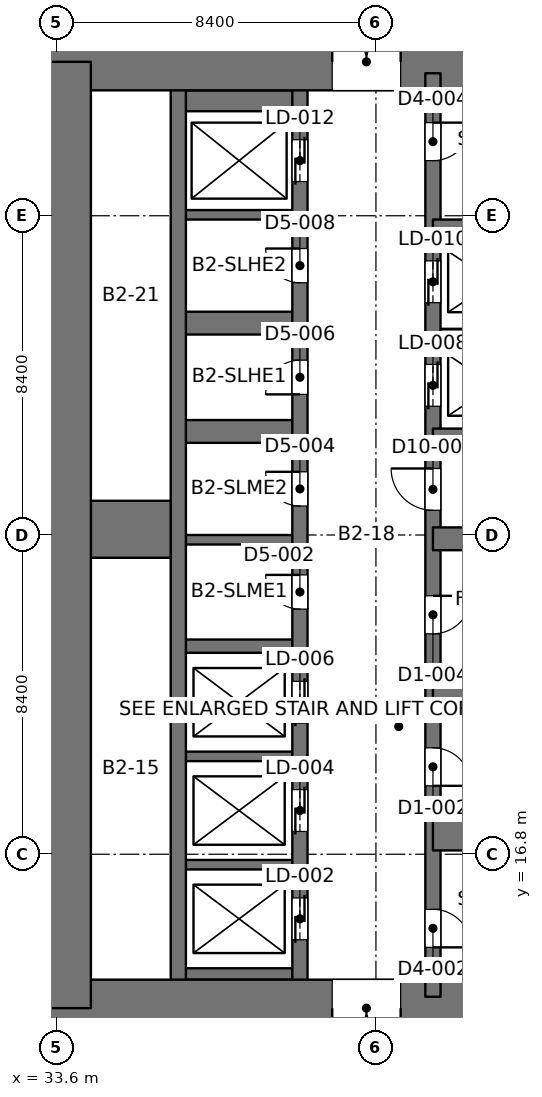
"""IFC4 building model, lengths in metres.
Left out: names, types, materials, properties, quantities, classifications, styles, units other than length and angle.
Written with IfcOpenShell. Run it as: python <this file> out.ifc"""

import sys

from ifc_helpers import new_model, si_unit, direction, frame, frame_2d, origin, place, context, subcontext, project, spatial, rectangle, extrude, element, fill, save


model = new_model("IFC4")
c1 = context("Model", 3, precision=1e-05, world=origin(), true_north=direction((0.0, 1.0)))
c2 = subcontext(c1, "Body", "Model", "MODEL_VIEW")
j1 = project(units=[si_unit("LENGTHUNIT", "METRE"), si_unit("PLANEANGLEUNIT", "RADIAN")], contexts=[c1])
p1 = place(None, origin())
s1 = spatial("IfcSite", under=j1, at=p1, CompositionType="ELEMENT")
p2 = place(p1, origin())
s2 = spatial("IfcBuilding", under=s1, at=p2, CompositionType="ELEMENT")
p3 = place(p2, frame((0.0, 0.0, -8.4)))
s3 = spatial("IfcBuildingStorey", under=s2, at=p3, CompositionType="ELEMENT", Elevation=-8.4)
p4 = place(p3, frame((33.0, 12.75, 0.0), z_axis=(0.0, 0.0, 1.0), x_axis=(1.0, 0.0, 0.0)))
e1 = element("IfcWall", 1, at=p4, inside=s3, PredefinedType="SHEAR", context=c2, shape_type="SweptSolid", body=[
    extrude(rectangle(XDim=19.2, YDim=1.5, at=frame_2d((9.6, 0.0))), origin(), (0.0, 0.0, 1.0), 4.2),
])
p5 = place(p4, frame((7.85, 0.0, 0.0)))
e2 = element("IfcOpeningElement", 2, at=p5, cuts=e1, PredefinedType="OPENING", context=c2, shape_type="SweptSolid", body=[
    extrude(rectangle(XDim=1.8, YDim=2.4, at=frame_2d((0.9, 1.2))), frame((0.0, 0.76, 0.0), z_axis=(0.0, -1.0, 0.0), x_axis=(1.0, 0.0, 0.0)), (0.0, 0.0, 1.0), 1.52),
])
p6 = place(p3, frame((33.0, 37.65, 0.0), z_axis=(0.0, 0.0, 1.0), x_axis=(1.0, 0.0, 0.0)))
e3 = element("IfcWall", 3, at=p6, inside=s3, PredefinedType="SHEAR", context=c2, shape_type="SweptSolid", body=[
    extrude(rectangle(XDim=19.2, YDim=1.5, at=frame_2d((9.6, 0.0))), origin(), (0.0, 0.0, 1.0), 4.2),
])
p7 = place(p6, frame((7.85, 0.0, 0.0)))
e4 = element("IfcOpeningElement", 4, at=p7, cuts=e3, PredefinedType="OPENING", context=c2, shape_type="SweptSolid", body=[
    extrude(rectangle(XDim=1.8, YDim=2.4, at=frame_2d((0.9, 1.2))), frame((0.0, 0.76, 0.0), z_axis=(0.0, -1.0, 0.0), x_axis=(1.0, 0.0, 0.0)), (0.0, 0.0, 1.0), 1.52),
])
p8 = place(p3, frame((33.75, 12.75, 0.0), z_axis=(0.0, 0.0, 1.0), x_axis=(0.0, 1.0, 0.0)))
e5 = element("IfcWall", 5, at=p8, inside=s3, PredefinedType="SHEAR", context=c2, shape_type="SweptSolid", body=[
    extrude(rectangle(XDim=24.9, YDim=1.5, at=frame_2d((12.45, 0.0))), origin(), (0.0, 0.0, 1.0), 4.2),
])
p9 = place(p3, frame((43.5, 13.05, 0.0), z_axis=(0.0, 0.0, 1.0), x_axis=(0.0, 1.0, 0.0)))
e6 = element("IfcWall", 6, at=p9, inside=s3, PredefinedType="SHEAR", context=c2, shape_type="SweptSolid", body=[
    extrude(rectangle(XDim=24.3, YDim=0.4, at=frame_2d((12.15, 0.0))), origin(), (0.0, 0.0, 1.0), 4.2),
])
p10 = place(p9, frame((1.3, 0.0, 0.0)))
e7 = element("IfcOpeningElement", 7, at=p10, cuts=e6, PredefinedType="OPENING", context=c2, shape_type="SweptSolid", body=[
    extrude(rectangle(XDim=1.0, YDim=2.2, at=frame_2d((0.5, 1.1))), frame((0.0, 0.21, 0.0), z_axis=(0.0, -1.0, 0.0), x_axis=(1.0, 0.0, 0.0)), (0.0, 0.0, 1.0), 0.42),
])
p11 = place(p9, frame((22.0, 0.0, 0.0)))
e8 = element("IfcOpeningElement", 8, at=p11, cuts=e6, PredefinedType="OPENING", context=c2, shape_type="SweptSolid", body=[
    extrude(rectangle(XDim=1.0, YDim=2.2, at=frame_2d((0.5, 1.1))), frame((0.0, 0.21, 0.0), z_axis=(0.0, -1.0, 0.0), x_axis=(1.0, 0.0, 0.0)), (0.0, 0.0, 1.0), 0.42),
])
p12 = place(p9, frame((5.55, 0.0, 0.0)))
e9 = element("IfcOpeningElement", 9, at=p12, cuts=e6, PredefinedType="OPENING", context=c2, shape_type="SweptSolid", body=[
    extrude(rectangle(XDim=1.0, YDim=2.2, at=frame_2d((0.5, 1.1))), frame((0.0, 0.21, 0.0), z_axis=(0.0, -1.0, 0.0), x_axis=(1.0, 0.0, 0.0)), (0.0, 0.0, 1.0), 0.42),
])
p13 = place(p9, frame((9.55, 0.0, 0.0)))
e10 = element("IfcOpeningElement", 10, at=p13, cuts=e6, PredefinedType="OPENING", context=c2, shape_type="SweptSolid", body=[
    extrude(rectangle(XDim=1.0, YDim=2.2, at=frame_2d((0.5, 1.1))), frame((0.0, 0.21, 0.0), z_axis=(0.0, -1.0, 0.0), x_axis=(1.0, 0.0, 0.0)), (0.0, 0.0, 1.0), 0.42),
])
p14 = place(p9, frame((12.8, 0.0, 0.0)))
e11 = element("IfcOpeningElement", 11, at=p14, cuts=e6, PredefinedType="OPENING", context=c2, shape_type="SweptSolid", body=[
    extrude(rectangle(XDim=1.1, YDim=2.2, at=frame_2d((0.55, 1.1))), frame((0.0, 0.21, 0.0), z_axis=(0.0, -1.0, 0.0), x_axis=(1.0, 0.0, 0.0)), (0.0, 0.0, 1.0), 0.42),
])
p15 = place(p9, frame((15.538, 0.0, 0.0)))
e12 = element("IfcOpeningElement", 12, at=p15, cuts=e6, PredefinedType="OPENING", context=c2, shape_type="SweptSolid", body=[
    extrude(rectangle(XDim=1.1, YDim=2.2, at=frame_2d((0.55, 1.1))), frame((0.0, 0.21, 0.0), z_axis=(0.0, -1.0, 0.0), x_axis=(1.0, 0.0, 0.0)), (0.0, 0.0, 1.0), 0.42),
])
p16 = place(p9, frame((18.262, 0.0, 0.0)))
e13 = element("IfcOpeningElement", 13, at=p16, cuts=e6, PredefinedType="OPENING", context=c2, shape_type="SweptSolid", body=[
    extrude(rectangle(XDim=1.1, YDim=2.2, at=frame_2d((0.55, 1.1))), frame((0.0, 0.21, 0.0), z_axis=(0.0, -1.0, 0.0), x_axis=(1.0, 0.0, 0.0)), (0.0, 0.0, 1.0), 0.42),
])
p17 = place(p3, frame((40.0, 13.05, 0.0), z_axis=(0.0, 0.0, 1.0), x_axis=(0.0, 1.0, 0.0)))
e14 = element("IfcWall", 14, at=p17, inside=s3, PredefinedType="SHEAR", context=c2, shape_type="SweptSolid", body=[
    extrude(rectangle(XDim=24.3, YDim=0.4, at=frame_2d((12.15, 0.0))), origin(), (0.0, 0.0, 1.0), 4.2),
])
p18 = place(p17, frame((1.5, 0.0, 0.0)))
e15 = element("IfcOpeningElement", 15, at=p18, cuts=e14, PredefinedType="OPENING", context=c2, shape_type="SweptSolid", body=[
    extrude(rectangle(XDim=1.1, YDim=2.2, at=frame_2d((0.55, 1.1))), frame((0.0, 0.21, 0.0), z_axis=(0.0, -1.0, 0.0), x_axis=(1.0, 0.0, 0.0)), (0.0, 0.0, 1.0), 0.42),
])
p19 = place(p17, frame((4.35, 0.0, 0.0)))
e16 = element("IfcOpeningElement", 16, at=p19, cuts=e14, PredefinedType="OPENING", context=c2, shape_type="SweptSolid", body=[
    extrude(rectangle(XDim=1.1, YDim=2.2, at=frame_2d((0.55, 1.1))), frame((0.0, 0.21, 0.0), z_axis=(0.0, -1.0, 0.0), x_axis=(1.0, 0.0, 0.0)), (0.0, 0.0, 1.0), 0.42),
])
p20 = place(p17, frame((7.2, 0.0, 0.0)))
e17 = element("IfcOpeningElement", 17, at=p20, cuts=e14, PredefinedType="OPENING", context=c2, shape_type="SweptSolid", body=[
    extrude(rectangle(XDim=1.1, YDim=2.2, at=frame_2d((0.55, 1.1))), frame((0.0, 0.21, 0.0), z_axis=(0.0, -1.0, 0.0), x_axis=(1.0, 0.0, 0.0)), (0.0, 0.0, 1.0), 0.42),
])
p21 = place(p17, frame((21.45, 0.0, 0.0)))
e18 = element("IfcOpeningElement", 18, at=p21, cuts=e14, PredefinedType="OPENING", context=c2, shape_type="SweptSolid", body=[
    extrude(rectangle(XDim=1.1, YDim=2.2, at=frame_2d((0.55, 1.1))), frame((0.0, 0.21, 0.0), z_axis=(0.0, -1.0, 0.0), x_axis=(1.0, 0.0, 0.0)), (0.0, 0.0, 1.0), 0.42),
])
p22 = place(p17, frame((10.2, 0.0, 0.0)))
e19 = element("IfcOpeningElement", 19, at=p22, cuts=e14, PredefinedType="OPENING", context=c2, shape_type="SweptSolid", body=[
    extrude(rectangle(XDim=0.9, YDim=2.2, at=frame_2d((0.45, 1.1))), frame((0.0, 0.21, 0.0), z_axis=(0.0, -1.0, 0.0), x_axis=(1.0, 0.0, 0.0)), (0.0, 0.0, 1.0), 0.42),
])
p23 = place(p17, frame((12.913, 0.0, 0.0)))
e20 = element("IfcOpeningElement", 20, at=p23, cuts=e14, PredefinedType="OPENING", context=c2, shape_type="SweptSolid", body=[
    extrude(rectangle(XDim=0.9, YDim=2.2, at=frame_2d((0.45, 1.1))), frame((0.0, 0.21, 0.0), z_axis=(0.0, -1.0, 0.0), x_axis=(1.0, 0.0, 0.0)), (0.0, 0.0, 1.0), 0.42),
])
p24 = place(p17, frame((15.85, 0.0, 0.0)))
e21 = element("IfcOpeningElement", 21, at=p24, cuts=e14, PredefinedType="OPENING", context=c2, shape_type="SweptSolid", body=[
    extrude(rectangle(XDim=0.9, YDim=2.2, at=frame_2d((0.45, 1.1))), frame((0.0, 0.21, 0.0), z_axis=(0.0, -1.0, 0.0), x_axis=(1.0, 0.0, 0.0)), (0.0, 0.0, 1.0), 0.42),
])
p25 = place(p17, frame((18.788, 0.0, 0.0)))
e22 = element("IfcOpeningElement", 22, at=p25, cuts=e14, PredefinedType="OPENING", context=c2, shape_type="SweptSolid", body=[
    extrude(rectangle(XDim=0.9, YDim=2.2, at=frame_2d((0.45, 1.1))), frame((0.0, 0.21, 0.0), z_axis=(0.0, -1.0, 0.0), x_axis=(1.0, 0.0, 0.0)), (0.0, 0.0, 1.0), 0.42),
])
p26 = place(p3, frame((36.8, 13.05, 0.0), z_axis=(0.0, 0.0, 1.0), x_axis=(0.0, 1.0, 0.0)))
e23 = element("IfcWall", 23, at=p26, inside=s3, PredefinedType="SHEAR", context=c2, shape_type="SweptSolid", body=[
    extrude(rectangle(XDim=24.3, YDim=0.4, at=frame_2d((12.15, 0.0))), origin(), (0.0, 0.0, 1.0), 4.2),
])
p27 = place(p3, frame((51.15, 17.35, 0.0), z_axis=(0.0, 0.0, 1.0), x_axis=(-1.0, 0.0, 0.0)))
e24 = element("IfcWall", 24, at=p27, inside=s3, PredefinedType="SHEAR", context=c2, shape_type="SweptSolid", body=[
    extrude(rectangle(XDim=7.65, YDim=0.9, at=frame_2d((3.825, 0.0))), origin(), (0.0, 0.0, 1.0), 4.2),
])
for number, where, z_axis, x_axis in (
    (25, (51.15, 21.1, 0.0), (0.0, 0.0, 1.0), (-1.0, 0.0, 0.0)),
    (26, (51.15, 25.1, 0.0), (0.0, 0.0, 1.0), (-1.0, 0.0, 0.0)),
    (27, (51.15, 27.7, 0.0), (0.0, 0.0, 1.0), (-1.0, 0.0, 0.0)),
):
    element("IfcWall", number, at=place(p3, frame(where, z_axis=z_axis, x_axis=x_axis)), inside=s3, PredefinedType="SHEAR", context=c2, shape_type="SweptSolid", body=[
        extrude(rectangle(XDim=7.65, YDim=0.6, at=frame_2d((3.825, 0.0))), origin(), (0.0, 0.0, 1.0), 4.2),
    ])
p28 = place(p3, frame((46.7, 33.3, 0.0), z_axis=(0.0, 0.0, 1.0), x_axis=(-1.0, 0.0, 0.0)))
e28 = element("IfcWall", 28, at=p28, inside=s3, PredefinedType="SHEAR", context=c2, shape_type="SweptSolid", body=[
    extrude(rectangle(XDim=3.2, YDim=0.4, at=frame_2d((1.6, 0.0))), origin(), (0.0, 0.0, 1.0), 4.2),
])
p29 = place(p3, frame((46.7, 30.5, 0.0), z_axis=(0.0, 0.0, 1.0), x_axis=(-1.0, 0.0, 0.0)))
e29 = element("IfcWall", 29, at=p29, inside=s3, PredefinedType="SHEAR", context=c2, shape_type="SweptSolid", body=[
    extrude(rectangle(XDim=3.2, YDim=0.25, at=frame_2d((1.6, 0.0))), origin(), (0.0, 0.0, 1.0), 4.2),
])
p30 = place(p3, frame((36.6, 25.35, 0.0), z_axis=(0.0, 0.0, 1.0), x_axis=(-1.0, 0.0, 0.0)))
e30 = element("IfcWall", 30, at=p30, inside=s3, PredefinedType="SHEAR", context=c2, shape_type="SweptSolid", body=[
    extrude(rectangle(XDim=2.1, YDim=1.5, at=frame_2d((1.05, 0.0))), origin(), (0.0, 0.0, 1.0), 4.2),
])
p31 = place(p3, frame((40.0, 13.65, 0.0), z_axis=(0.0, 0.0, 1.0), x_axis=(-1.0, 0.0, 0.0)))
e31 = element("IfcWall", 31, at=p31, inside=s3, PredefinedType="SHEAR", context=c2, shape_type="SweptSolid", body=[
    extrude(rectangle(XDim=3.2, YDim=0.3, at=frame_2d((1.6, 0.0))), origin(), (0.0, 0.0, 1.0), 4.2),
])
for number, where, z_axis, x_axis in (
    (32, (40.0, 16.525, 0.0), (0.0, 0.0, 1.0), (-1.0, 0.0, 0.0)),
    (33, (40.0, 19.375, 0.0), (0.0, 0.0, 1.0), (-1.0, 0.0, 0.0)),
):
    element("IfcWall", number, at=place(p3, frame(where, z_axis=z_axis, x_axis=x_axis)), inside=s3, PredefinedType="SHEAR", context=c2, shape_type="SweptSolid", body=[
        extrude(rectangle(XDim=3.2, YDim=0.25, at=frame_2d((1.6, 0.0))), origin(), (0.0, 0.0, 1.0), 4.2),
    ])
p32 = place(p3, frame((40.0, 22.275, 0.0), z_axis=(0.0, 0.0, 1.0), x_axis=(-1.0, 0.0, 0.0)))
e34 = element("IfcWall", 34, at=p32, inside=s3, PredefinedType="SHEAR", context=c2, shape_type="SweptSolid", body=[
    extrude(rectangle(XDim=3.2, YDim=0.35, at=frame_2d((1.6, 0.0))), origin(), (0.0, 0.0, 1.0), 4.2),
])
p33 = place(p3, frame((40.0, 25.075, 0.0), z_axis=(0.0, 0.0, 1.0), x_axis=(-1.0, 0.0, 0.0)))
e35 = element("IfcWall", 35, at=p33, inside=s3, PredefinedType="SHEAR", context=c2, shape_type="SweptSolid", body=[
    extrude(rectangle(XDim=3.2, YDim=0.25, at=frame_2d((1.6, 0.0))), origin(), (0.0, 0.0, 1.0), 4.2),
])
for number, where, z_axis, x_axis in (
    (36, (40.0, 27.925, 0.0), (0.0, 0.0, 1.0), (-1.0, 0.0, 0.0)),
    (37, (40.0, 30.775, 0.0), (0.0, 0.0, 1.0), (-1.0, 0.0, 0.0)),
):
    element("IfcWall", number, at=place(p3, frame(where, z_axis=z_axis, x_axis=x_axis)), inside=s3, PredefinedType="SHEAR", context=c2, shape_type="SweptSolid", body=[
        extrude(rectangle(XDim=3.2, YDim=0.6, at=frame_2d((1.6, 0.0))), origin(), (0.0, 0.0, 1.0), 4.2),
    ])
p34 = place(p3, frame((40.0, 33.625, 0.0), z_axis=(0.0, 0.0, 1.0), x_axis=(-1.0, 0.0, 0.0)))
e38 = element("IfcWall", 38, at=p34, inside=s3, PredefinedType="SHEAR", context=c2, shape_type="SweptSolid", body=[
    extrude(rectangle(XDim=3.2, YDim=0.25, at=frame_2d((1.6, 0.0))), origin(), (0.0, 0.0, 1.0), 4.2),
])
p35 = place(p3, frame((40.0, 36.625, 0.0), z_axis=(0.0, 0.0, 1.0), x_axis=(-1.0, 0.0, 0.0)))
e39 = element("IfcWall", 39, at=p35, inside=s3, PredefinedType="SHEAR", context=c2, shape_type="SweptSolid", body=[
    extrude(rectangle(XDim=3.2, YDim=0.55, at=frame_2d((1.6, 0.0))), origin(), (0.0, 0.0, 1.0), 4.2),
])
p36 = place(p3, frame((16.82, 25.2, 0.0), z_axis=(0.0, 0.0, 1.0), x_axis=(1.0, 0.0, 0.0)))
e40 = element("IfcWall", 40, at=p36, inside=s3, PredefinedType="PARTITIONING", context=c2, shape_type="SweptSolid", body=[
    extrude(rectangle(XDim=16.76, YDim=0.25, at=frame_2d((8.38, 0.0))), origin(), (0.0, 0.0, 1.0), 3.85),
])
p37 = place(p36, frame((3.18, 0.0, 0.0)))
e41 = element("IfcOpeningElement", 41, at=p37, cuts=e40, PredefinedType="OPENING", context=c2, shape_type="SweptSolid", body=[
    extrude(rectangle(XDim=2.0, YDim=2.4, at=frame_2d((1.0, 1.2))), frame((0.0, 0.135, 0.0), z_axis=(0.0, -1.0, 0.0), x_axis=(1.0, 0.0, 0.0)), (0.0, 0.0, 1.0), 0.27),
])
p38 = place(p5, frame((1.8, 0.0, 0.0), z_axis=(0.0, 0.0, 1.0), x_axis=(-1.0, 0.0, 0.0)))
e42 = element("IfcDoor", 42, at=p38, inside=s3, OperationType="DOUBLE_DOOR_SINGLE_SWING", PredefinedType="DOOR", context=c2, shape_type="SweptSolid", body=[
    extrude(rectangle(XDim=1.8, YDim=2.4, at=frame_2d((0.9, 1.2))), frame((0.0, 0.025, 0.0), z_axis=(0.0, -1.0, 0.0), x_axis=(1.0, 0.0, 0.0)), (0.0, 0.0, 1.0), 0.05),
])
fill(e2, e42)
p39 = place(p7, origin())
e43 = element("IfcDoor", 43, at=p39, inside=s3, OperationType="DOUBLE_DOOR_SINGLE_SWING", PredefinedType="DOOR", context=c2, shape_type="SweptSolid", body=[
    extrude(rectangle(XDim=1.8, YDim=2.4, at=frame_2d((0.9, 1.2))), frame((0.0, 0.025, 0.0), z_axis=(0.0, -1.0, 0.0), x_axis=(1.0, 0.0, 0.0)), (0.0, 0.0, 1.0), 0.05),
])
fill(e4, e43)
p40 = place(p10, frame((1.0, 0.0, 0.0), z_axis=(0.0, 0.0, 1.0), x_axis=(-1.0, 0.0, 0.0)))
e44 = element("IfcDoor", 44, at=p40, inside=s3, OperationType="SINGLE_SWING_RIGHT", PredefinedType="DOOR", context=c2, shape_type="SweptSolid", body=[
    extrude(rectangle(XDim=1.0, YDim=2.2, at=frame_2d((0.5, 1.1))), frame((0.0, 0.025, 0.0), z_axis=(0.0, -1.0, 0.0), x_axis=(1.0, 0.0, 0.0)), (0.0, 0.0, 1.0), 0.05),
])
fill(e7, e44)
p41 = place(p11, frame((1.0, 0.0, 0.0), z_axis=(0.0, 0.0, 1.0), x_axis=(-1.0, 0.0, 0.0)))
e45 = element("IfcDoor", 45, at=p41, inside=s3, OperationType="SINGLE_SWING_LEFT", PredefinedType="DOOR", context=c2, shape_type="SweptSolid", body=[
    extrude(rectangle(XDim=1.0, YDim=2.2, at=frame_2d((0.5, 1.1))), frame((0.0, 0.025, 0.0), z_axis=(0.0, -1.0, 0.0), x_axis=(1.0, 0.0, 0.0)), (0.0, 0.0, 1.0), 0.05),
])
fill(e8, e45)
p42 = place(p12, frame((1.0, 0.0, 0.0), z_axis=(0.0, 0.0, 1.0), x_axis=(-1.0, 0.0, 0.0)))
e46 = element("IfcDoor", 46, at=p42, inside=s3, OperationType="SINGLE_SWING_RIGHT", PredefinedType="DOOR", context=c2, shape_type="SweptSolid", body=[
    extrude(rectangle(XDim=1.0, YDim=2.2, at=frame_2d((0.5, 1.1))), frame((0.0, 0.025, 0.0), z_axis=(0.0, -1.0, 0.0), x_axis=(1.0, 0.0, 0.0)), (0.0, 0.0, 1.0), 0.05),
])
fill(e9, e46)
p43 = place(p13, frame((1.0, 0.0, 0.0), z_axis=(0.0, 0.0, 1.0), x_axis=(-1.0, 0.0, 0.0)))
e47 = element("IfcDoor", 47, at=p43, inside=s3, OperationType="SINGLE_SWING_LEFT", PredefinedType="DOOR", context=c2, shape_type="SweptSolid", body=[
    extrude(rectangle(XDim=1.0, YDim=2.2, at=frame_2d((0.5, 1.1))), frame((0.0, 0.025, 0.0), z_axis=(0.0, -1.0, 0.0), x_axis=(1.0, 0.0, 0.0)), (0.0, 0.0, 1.0), 0.05),
])
fill(e10, e47)
p44 = place(p14, origin())
e48 = element("IfcDoor", 48, at=p44, inside=s3, OperationType="SINGLE_SWING_RIGHT", PredefinedType="DOOR", context=c2, shape_type="SweptSolid", body=[
    extrude(rectangle(XDim=1.1, YDim=2.2, at=frame_2d((0.55, 1.1))), frame((0.0, 0.025, 0.0), z_axis=(0.0, -1.0, 0.0), x_axis=(1.0, 0.0, 0.0)), (0.0, 0.0, 1.0), 0.05),
])
fill(e11, e48)
p45 = place(p18, origin())
e49 = element("IfcDoor", 49, at=p45, inside=s3, OperationType="DOUBLE_DOOR_SLIDING", PredefinedType="DOOR", context=c2, shape_type="SweptSolid", body=[
    extrude(rectangle(XDim=1.1, YDim=2.2, at=frame_2d((0.55, 1.1))), frame((0.0, 0.025, 0.0), z_axis=(0.0, -1.0, 0.0), x_axis=(1.0, 0.0, 0.0)), (0.0, 0.0, 1.0), 0.05),
])
fill(e15, e49)
p46 = place(p19, origin())
e50 = element("IfcDoor", 50, at=p46, inside=s3, OperationType="DOUBLE_DOOR_SLIDING", PredefinedType="DOOR", context=c2, shape_type="SweptSolid", body=[
    extrude(rectangle(XDim=1.1, YDim=2.2, at=frame_2d((0.55, 1.1))), frame((0.0, 0.025, 0.0), z_axis=(0.0, -1.0, 0.0), x_axis=(1.0, 0.0, 0.0)), (0.0, 0.0, 1.0), 0.05),
])
fill(e16, e50)
p47 = place(p20, origin())
e51 = element("IfcDoor", 51, at=p47, inside=s3, OperationType="DOUBLE_DOOR_SLIDING", PredefinedType="DOOR", context=c2, shape_type="SweptSolid", body=[
    extrude(rectangle(XDim=1.1, YDim=2.2, at=frame_2d((0.55, 1.1))), frame((0.0, 0.025, 0.0), z_axis=(0.0, -1.0, 0.0), x_axis=(1.0, 0.0, 0.0)), (0.0, 0.0, 1.0), 0.05),
])
fill(e17, e51)
p48 = place(p21, origin())
e52 = element("IfcDoor", 52, at=p48, inside=s3, OperationType="DOUBLE_DOOR_SLIDING", PredefinedType="DOOR", context=c2, shape_type="SweptSolid", body=[
    extrude(rectangle(XDim=1.1, YDim=2.2, at=frame_2d((0.55, 1.1))), frame((0.0, 0.025, 0.0), z_axis=(0.0, -1.0, 0.0), x_axis=(1.0, 0.0, 0.0)), (0.0, 0.0, 1.0), 0.05),
])
fill(e18, e52)
p49 = place(p15, origin())
e53 = element("IfcDoor", 53, at=p49, inside=s3, OperationType="DOUBLE_DOOR_SLIDING", PredefinedType="DOOR", context=c2, shape_type="SweptSolid", body=[
    extrude(rectangle(XDim=1.1, YDim=2.2, at=frame_2d((0.55, 1.1))), frame((0.0, 0.025, 0.0), z_axis=(0.0, -1.0, 0.0), x_axis=(1.0, 0.0, 0.0)), (0.0, 0.0, 1.0), 0.05),
])
fill(e12, e53)
p50 = place(p16, origin())
e54 = element("IfcDoor", 54, at=p50, inside=s3, OperationType="DOUBLE_DOOR_SLIDING", PredefinedType="DOOR", context=c2, shape_type="SweptSolid", body=[
    extrude(rectangle(XDim=1.1, YDim=2.2, at=frame_2d((0.55, 1.1))), frame((0.0, 0.025, 0.0), z_axis=(0.0, -1.0, 0.0), x_axis=(1.0, 0.0, 0.0)), (0.0, 0.0, 1.0), 0.05),
])
fill(e13, e54)
p51 = place(p22, origin())
e55 = element("IfcDoor", 55, at=p51, inside=s3, OperationType="SINGLE_SWING_RIGHT", PredefinedType="DOOR", context=c2, shape_type="SweptSolid", body=[
    extrude(rectangle(XDim=0.9, YDim=2.2, at=frame_2d((0.45, 1.1))), frame((0.0, 0.025, 0.0), z_axis=(0.0, -1.0, 0.0), x_axis=(1.0, 0.0, 0.0)), (0.0, 0.0, 1.0), 0.05),
])
fill(e19, e55)
p52 = place(p23, origin())
e56 = element("IfcDoor", 56, at=p52, inside=s3, OperationType="SINGLE_SWING_RIGHT", PredefinedType="DOOR", context=c2, shape_type="SweptSolid", body=[
    extrude(rectangle(XDim=0.9, YDim=2.2, at=frame_2d((0.45, 1.1))), frame((0.0, 0.025, 0.0), z_axis=(0.0, -1.0, 0.0), x_axis=(1.0, 0.0, 0.0)), (0.0, 0.0, 1.0), 0.05),
])
fill(e20, e56)
p53 = place(p24, origin())
e57 = element("IfcDoor", 57, at=p53, inside=s3, OperationType="SINGLE_SWING_LEFT", PredefinedType="DOOR", context=c2, shape_type="SweptSolid", body=[
    extrude(rectangle(XDim=0.9, YDim=2.2, at=frame_2d((0.45, 1.1))), frame((0.0, 0.025, 0.0), z_axis=(0.0, -1.0, 0.0), x_axis=(1.0, 0.0, 0.0)), (0.0, 0.0, 1.0), 0.05),
])
fill(e21, e57)
p54 = place(p25, origin())
e58 = element("IfcDoor", 58, at=p54, inside=s3, OperationType="SINGLE_SWING_RIGHT", PredefinedType="DOOR", context=c2, shape_type="SweptSolid", body=[
    extrude(rectangle(XDim=0.9, YDim=2.2, at=frame_2d((0.45, 1.1))), frame((0.0, 0.025, 0.0), z_axis=(0.0, -1.0, 0.0), x_axis=(1.0, 0.0, 0.0)), (0.0, 0.0, 1.0), 0.05),
])
fill(e22, e58)
save(model, sys.argv[1])
